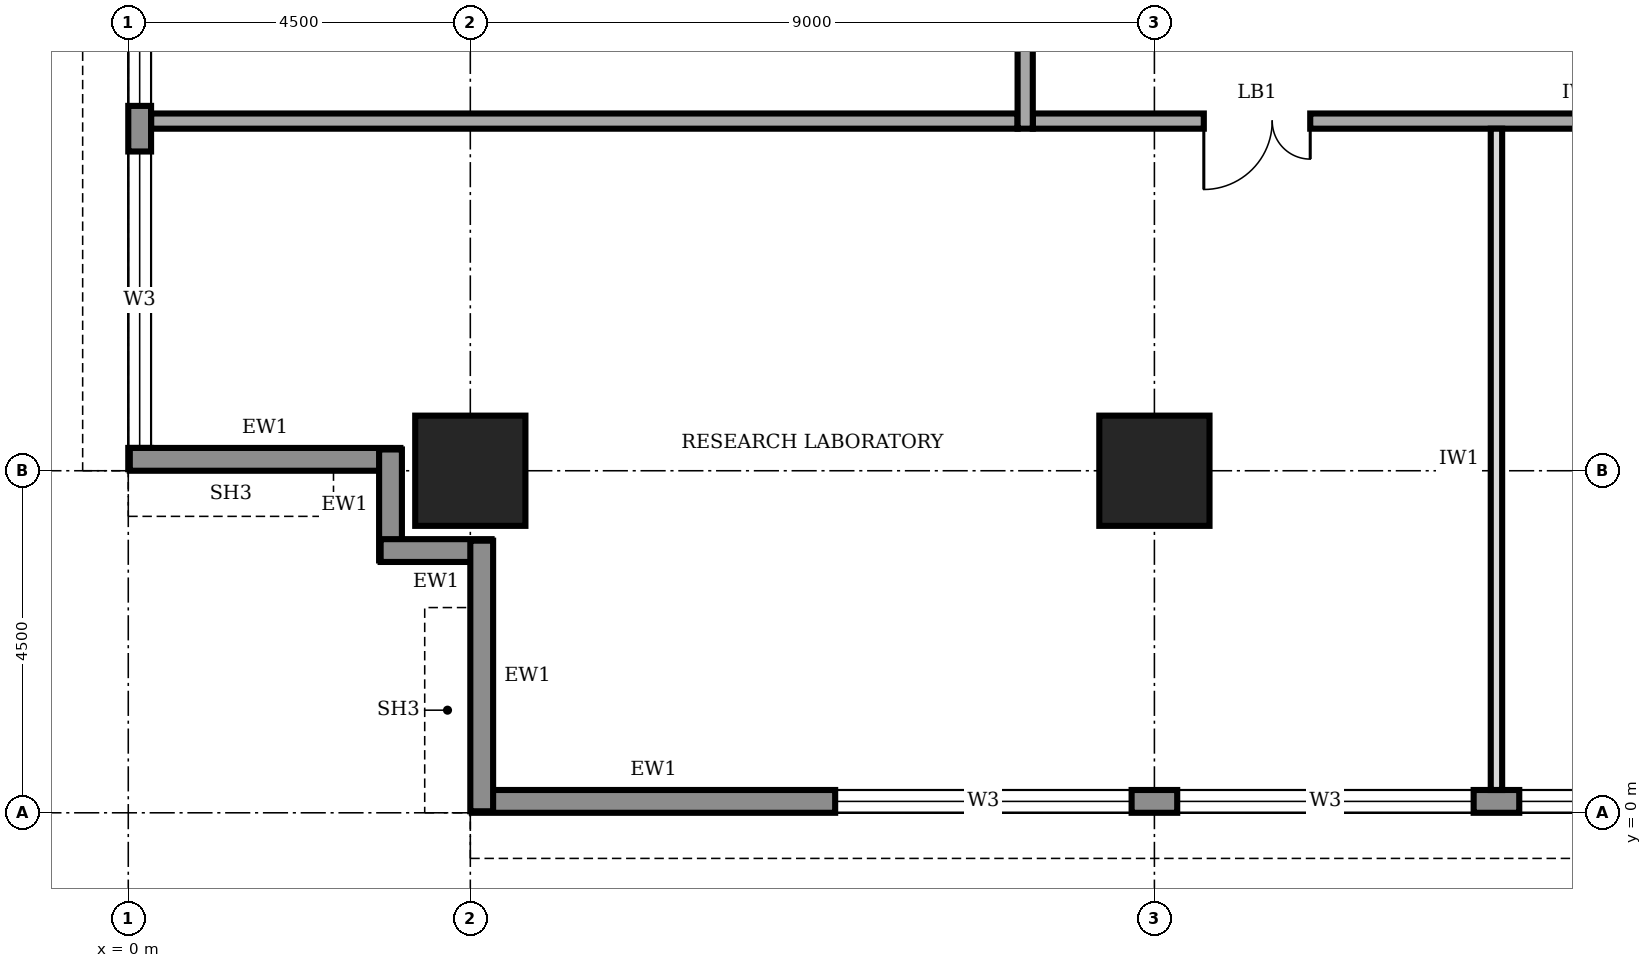
"""IFC4 building model, lengths in metres.
Left out: names, types, materials, properties, quantities, classifications, styles, units other than length and angle.
Written with IfcOpenShell. Run it as: python <this file> out.ifc"""

import sys

from ifc_helpers import new_model, si_unit, direction, frame, frame_2d, origin, origin_2d, place, context, subcontext, project, spatial, rectangle, extrude, element, fill, save


model = new_model("IFC4")
c1 = context("Model", 3, precision=1e-05, world=origin(), true_north=direction((0.0, 1.0)))
c2 = subcontext(c1, "Body", "Model", "MODEL_VIEW")
j1 = project(units=[si_unit("LENGTHUNIT", "METRE"), si_unit("PLANEANGLEUNIT", "RADIAN")], contexts=[c1])
p1 = place(None, origin())
s1 = spatial("IfcSite", under=j1, at=p1, CompositionType="ELEMENT")
p2 = place(p1, origin())
s2 = spatial("IfcBuilding", under=s1, at=p2, CompositionType="ELEMENT")
p3 = place(p2, frame((0.0, 0.0, 253.0)))
s3 = spatial("IfcBuildingStorey", under=s2, at=p3, CompositionType="ELEMENT", Elevation=253.0)
for number, where, z_axis, x_axis in (
    (1, (4.5, 4.5, 0.0), (0.0, 0.0, 1.0), (1.0, 0.0, 0.0)),
    (2, (13.5, 4.5, 0.0), (0.0, 0.0, 1.0), (1.0, 0.0, 0.0)),
):
    element("IfcColumn", number, at=place(p3, frame(where, z_axis=z_axis, x_axis=x_axis)), inside=s3, PredefinedType="COLUMN", context=c2, shape_type="SweptSolid", body=[
        extrude(rectangle(XDim=1.45, YDim=1.45, at=origin_2d()), origin(), (0.0, 0.0, 1.0), 4.0),
    ])
p4 = place(p3, frame((4.52, 0.15, 0.0), z_axis=(0.0, 0.0, 1.0), x_axis=(1.0, 0.0, 0.0)))
e3 = element("IfcWall", 3, at=p4, inside=s3, PredefinedType="STANDARD", context=c2, shape_type="SweptSolid", body=[
    extrude(rectangle(XDim=31.46, YDim=0.3, at=frame_2d((15.73, 0.0))), origin(), (0.0, 0.0, 1.0), 3.75),
])
p5 = place(p4, frame((4.78, 0.0, 0.95)))
e4 = element("IfcOpeningElement", 4, at=p5, cuts=e3, PredefinedType="OPENING", context=c2, shape_type="SweptSolid", body=[
    extrude(rectangle(XDim=3.9, YDim=1.8, at=frame_2d((1.95, 0.9))), frame((0.0, 0.16, 0.0), z_axis=(0.0, -1.0, 0.0), x_axis=(1.0, 0.0, 0.0)), (0.0, 0.0, 1.0), 0.32),
])
p6 = place(p4, frame((9.28, 0.0, 0.95)))
e5 = element("IfcOpeningElement", 5, at=p6, cuts=e3, PredefinedType="OPENING", context=c2, shape_type="SweptSolid", body=[
    extrude(rectangle(XDim=3.9, YDim=1.8, at=frame_2d((1.95, 0.9))), frame((0.0, 0.16, 0.0), z_axis=(0.0, -1.0, 0.0), x_axis=(1.0, 0.0, 0.0)), (0.0, 0.0, 1.0), 0.32),
])
p7 = place(p4, frame((13.78, 0.0, 0.95)))
e6 = element("IfcOpeningElement", 6, at=p7, cuts=e3, PredefinedType="OPENING", context=c2, shape_type="SweptSolid", body=[
    extrude(rectangle(XDim=3.9, YDim=1.8, at=frame_2d((1.95, 0.9))), frame((0.0, 0.16, 0.0), z_axis=(0.0, -1.0, 0.0), x_axis=(1.0, 0.0, 0.0)), (0.0, 0.0, 1.0), 0.32),
])
p8 = place(p4, frame((18.28, 0.0, 0.95)))
e7 = element("IfcOpeningElement", 7, at=p8, cuts=e3, PredefinedType="OPENING", context=c2, shape_type="SweptSolid", body=[
    extrude(rectangle(XDim=3.9, YDim=1.8, at=frame_2d((1.95, 0.9))), frame((0.0, 0.16, 0.0), z_axis=(0.0, -1.0, 0.0), x_axis=(1.0, 0.0, 0.0)), (0.0, 0.0, 1.0), 0.32),
])
p9 = place(p4, frame((22.78, 0.0, 0.95)))
e8 = element("IfcOpeningElement", 8, at=p9, cuts=e3, PredefinedType="OPENING", context=c2, shape_type="SweptSolid", body=[
    extrude(rectangle(XDim=3.9, YDim=1.8, at=frame_2d((1.95, 0.9))), frame((0.0, 0.16, 0.0), z_axis=(0.0, -1.0, 0.0), x_axis=(1.0, 0.0, 0.0)), (0.0, 0.0, 1.0), 0.32),
])
p10 = place(p4, frame((27.28, 0.0, 0.95)))
e9 = element("IfcOpeningElement", 9, at=p10, cuts=e3, PredefinedType="OPENING", context=c2, shape_type="SweptSolid", body=[
    extrude(rectangle(XDim=3.9, YDim=1.8, at=frame_2d((1.95, 0.9))), frame((0.0, 0.16, 0.0), z_axis=(0.0, -1.0, 0.0), x_axis=(1.0, 0.0, 0.0)), (0.0, 0.0, 1.0), 0.32),
])
p11 = place(p3, frame((0.15, 35.98, 0.0), z_axis=(0.0, 0.0, 1.0), x_axis=(0.0, -1.0, 0.0)))
e10 = element("IfcWall", 10, at=p11, inside=s3, PredefinedType="STANDARD", context=c2, shape_type="SweptSolid", body=[
    extrude(rectangle(XDim=31.46, YDim=0.3, at=frame_2d((15.73, 0.0))), origin(), (0.0, 0.0, 1.0), 3.75),
])
p12 = place(p11, frame((27.28, 0.0, 0.95)))
e11 = element("IfcOpeningElement", 11, at=p12, cuts=e10, PredefinedType="OPENING", context=c2, shape_type="SweptSolid", body=[
    extrude(rectangle(XDim=3.9, YDim=1.8, at=frame_2d((1.95, 0.9))), frame((0.0, 0.16, 0.0), z_axis=(0.0, -1.0, 0.0), x_axis=(1.0, 0.0, 0.0)), (0.0, 0.0, 1.0), 0.32),
])
p13 = place(p11, frame((22.78, 0.0, 0.95)))
e12 = element("IfcOpeningElement", 12, at=p13, cuts=e10, PredefinedType="OPENING", context=c2, shape_type="SweptSolid", body=[
    extrude(rectangle(XDim=3.9, YDim=1.8, at=frame_2d((1.95, 0.9))), frame((0.0, 0.16, 0.0), z_axis=(0.0, -1.0, 0.0), x_axis=(1.0, 0.0, 0.0)), (0.0, 0.0, 1.0), 0.32),
])
p14 = place(p11, frame((18.28, 0.0, 0.95)))
e13 = element("IfcOpeningElement", 13, at=p14, cuts=e10, PredefinedType="OPENING", context=c2, shape_type="SweptSolid", body=[
    extrude(rectangle(XDim=3.9, YDim=1.8, at=frame_2d((1.95, 0.9))), frame((0.0, 0.16, 0.0), z_axis=(0.0, -1.0, 0.0), x_axis=(1.0, 0.0, 0.0)), (0.0, 0.0, 1.0), 0.32),
])
p15 = place(p11, frame((13.78, 0.0, 0.95)))
e14 = element("IfcOpeningElement", 14, at=p15, cuts=e10, PredefinedType="OPENING", context=c2, shape_type="SweptSolid", body=[
    extrude(rectangle(XDim=3.9, YDim=1.8, at=frame_2d((1.95, 0.9))), frame((0.0, 0.16, 0.0), z_axis=(0.0, -1.0, 0.0), x_axis=(1.0, 0.0, 0.0)), (0.0, 0.0, 1.0), 0.32),
])
p16 = place(p11, frame((9.28, 0.0, 0.95)))
e15 = element("IfcOpeningElement", 15, at=p16, cuts=e10, PredefinedType="OPENING", context=c2, shape_type="SweptSolid", body=[
    extrude(rectangle(XDim=3.9, YDim=1.8, at=frame_2d((1.95, 0.9))), frame((0.0, 0.16, 0.0), z_axis=(0.0, -1.0, 0.0), x_axis=(1.0, 0.0, 0.0)), (0.0, 0.0, 1.0), 0.32),
])
p17 = place(p11, frame((4.78, 0.0, 0.95)))
e16 = element("IfcOpeningElement", 16, at=p17, cuts=e10, PredefinedType="OPENING", context=c2, shape_type="SweptSolid", body=[
    extrude(rectangle(XDim=3.9, YDim=1.8, at=frame_2d((1.95, 0.9))), frame((0.0, 0.16, 0.0), z_axis=(0.0, -1.0, 0.0), x_axis=(1.0, 0.0, 0.0)), (0.0, 0.0, 1.0), 0.32),
])
p18 = place(p3, frame((0.02, 4.65, 0.0), z_axis=(0.0, 0.0, 1.0), x_axis=(1.0, 0.0, 0.0)))
e17 = element("IfcWall", 17, at=p18, inside=s3, PredefinedType="STANDARD", context=c2, shape_type="SweptSolid", body=[
    extrude(rectangle(XDim=3.56, YDim=0.3, at=frame_2d((1.78, 0.0))), origin(), (0.0, 0.0, 1.0), 2.85),
])
for number, where, z_axis, x_axis in (
    (18, (3.45, 4.78, 0.0), (0.0, 0.0, 1.0), (0.0, -1.0, 0.0)),
    (19, (3.32, 3.45, 0.0), (0.0, 0.0, 1.0), (1.0, 0.0, 0.0)),
):
    element("IfcWall", number, at=place(p3, frame(where, z_axis=z_axis, x_axis=x_axis)), inside=s3, PredefinedType="STANDARD", context=c2, shape_type="SweptSolid", body=[
        extrude(rectangle(XDim=1.46, YDim=0.3, at=frame_2d((0.73, 0.0))), origin(), (0.0, 0.0, 1.0), 3.75),
    ])
p19 = place(p3, frame((4.65, 3.58, 0.0), z_axis=(0.0, 0.0, 1.0), x_axis=(0.0, -1.0, 0.0)))
e20 = element("IfcWall", 20, at=p19, inside=s3, PredefinedType="STANDARD", context=c2, shape_type="SweptSolid", body=[
    extrude(rectangle(XDim=3.56, YDim=0.3, at=frame_2d((1.78, 0.0))), origin(), (0.0, 0.0, 1.0), 2.85),
])
p20 = place(p3, frame((11.9, 9.1, 0.0), z_axis=(0.0, 0.0, 1.0), x_axis=(1.0, 0.0, 0.0)))
e21 = element("IfcWall", 21, at=p20, inside=s3, PredefinedType="SOLIDWALL", context=c2, shape_type="SweptSolid", body=[
    extrude(rectangle(XDim=16.9, YDim=0.2, at=frame_2d((8.45, 0.0))), origin(), (0.0, 0.0, 1.0), 3.75),
])
p21 = place(p20, frame((2.25, 0.0, 0.0)))
e22 = element("IfcOpeningElement", 22, at=p21, cuts=e21, PredefinedType="OPENING", context=c2, shape_type="SweptSolid", body=[
    extrude(rectangle(XDim=1.4, YDim=2.1, at=frame_2d((0.7, 1.05))), frame((0.0, 0.11, 0.0), z_axis=(0.0, -1.0, 0.0), x_axis=(1.0, 0.0, 0.0)), (0.0, 0.0, 1.0), 0.22),
])
p22 = place(p20, frame((10.8, 0.0, 0.0)))
e23 = element("IfcOpeningElement", 23, at=p22, cuts=e21, PredefinedType="OPENING", context=c2, shape_type="SweptSolid", body=[
    extrude(rectangle(XDim=1.4, YDim=2.1, at=frame_2d((0.7, 1.05))), frame((0.0, 0.11, 0.0), z_axis=(0.0, -1.0, 0.0), x_axis=(1.0, 0.0, 0.0)), (0.0, 0.0, 1.0), 0.22),
])
p23 = place(p3, frame((11.8, 31.3, 0.0), z_axis=(0.0, 0.0, 1.0), x_axis=(0.0, -1.0, 0.0)))
e24 = element("IfcWall", 24, at=p23, inside=s3, PredefinedType="SOLIDWALL", context=c2, shape_type="SweptSolid", body=[
    extrude(rectangle(XDim=22.3, YDim=0.2, at=frame_2d((11.15, 0.0))), origin(), (0.0, 0.0, 1.0), 3.75),
])
p24 = place(p23, frame((19.55, 0.0, 0.0)))
e25 = element("IfcOpeningElement", 25, at=p24, cuts=e24, PredefinedType="OPENING", context=c2, shape_type="SweptSolid", body=[
    extrude(rectangle(XDim=1.0, YDim=2.1, at=frame_2d((0.5, 1.05))), frame((0.0, 0.11, 0.0), z_axis=(0.0, -1.0, 0.0), x_axis=(1.0, 0.0, 0.0)), (0.0, 0.0, 1.0), 0.22),
])
p25 = place(p23, frame((15.65, 0.0, 0.0)))
e26 = element("IfcOpeningElement", 26, at=p25, cuts=e24, PredefinedType="OPENING", context=c2, shape_type="SweptSolid", body=[
    extrude(rectangle(XDim=0.9, YDim=2.1, at=frame_2d((0.45, 1.05))), frame((0.0, 0.11, 0.0), z_axis=(0.0, -1.0, 0.0), x_axis=(1.0, 0.0, 0.0)), (0.0, 0.0, 1.0), 0.22),
])
p26 = place(p23, frame((10.85, 0.0, 0.0)))
e27 = element("IfcOpeningElement", 27, at=p26, cuts=e24, PredefinedType="OPENING", context=c2, shape_type="SweptSolid", body=[
    extrude(rectangle(XDim=0.9, YDim=2.1, at=frame_2d((0.45, 1.05))), frame((0.0, 0.11, 0.0), z_axis=(0.0, -1.0, 0.0), x_axis=(1.0, 0.0, 0.0)), (0.0, 0.0, 1.0), 0.22),
])
p27 = place(p23, frame((7.8, 0.0, 0.0)))
e28 = element("IfcOpeningElement", 28, at=p27, cuts=e24, PredefinedType="OPENING", context=c2, shape_type="SweptSolid", body=[
    extrude(rectangle(XDim=0.9, YDim=2.1, at=frame_2d((0.45, 1.05))), frame((0.0, 0.11, 0.0), z_axis=(0.0, -1.0, 0.0), x_axis=(1.0, 0.0, 0.0)), (0.0, 0.0, 1.0), 0.22),
])
p28 = place(p23, frame((4.8, 0.0, 0.0)))
e29 = element("IfcOpeningElement", 29, at=p28, cuts=e24, PredefinedType="OPENING", context=c2, shape_type="SweptSolid", body=[
    extrude(rectangle(XDim=1.0, YDim=2.1, at=frame_2d((0.5, 1.05))), frame((0.0, 0.11, 0.0), z_axis=(0.0, -1.0, 0.0), x_axis=(1.0, 0.0, 0.0)), (0.0, 0.0, 1.0), 0.22),
])
p29 = place(p23, frame((12.9, 0.0, 0.0)))
e30 = element("IfcOpeningElement", 30, at=p29, cuts=e24, PredefinedType="OPENING", context=c2, shape_type="SweptSolid", body=[
    extrude(rectangle(XDim=1.0, YDim=2.1, at=frame_2d((0.5, 1.05))), frame((0.0, 0.11, 0.0), z_axis=(0.0, -1.0, 0.0), x_axis=(1.0, 0.0, 0.0)), (0.0, 0.0, 1.0), 0.22),
])
p30 = place(p23, frame((1.55, 0.0, 0.0)))
e31 = element("IfcOpeningElement", 31, at=p30, cuts=e24, PredefinedType="OPENING", context=c2, shape_type="SweptSolid", body=[
    extrude(rectangle(XDim=1.0, YDim=2.1, at=frame_2d((0.5, 1.05))), frame((0.0, 0.11, 0.0), z_axis=(0.0, -1.0, 0.0), x_axis=(1.0, 0.0, 0.0)), (0.0, 0.0, 1.0), 0.22),
])
p31 = place(p3, frame((0.3, 9.1, 0.0), z_axis=(0.0, 0.0, 1.0), x_axis=(1.0, 0.0, 0.0)))
e32 = element("IfcWall", 32, at=p31, inside=s3, PredefinedType="SOLIDWALL", context=c2, shape_type="SweptSolid", body=[
    extrude(rectangle(XDim=11.4, YDim=0.2, at=frame_2d((5.7, 0.0))), origin(), (0.0, 0.0, 1.0), 3.75),
])
p32 = place(p3, frame((18.0, 0.3, 0.0), z_axis=(0.0, 0.0, 1.0), x_axis=(0.0, 1.0, 0.0)))
e33 = element("IfcWall", 33, at=p32, inside=s3, PredefinedType="PARTITIONING", context=c2, shape_type="SweptSolid", body=[
    extrude(rectangle(XDim=8.7, YDim=0.15, at=frame_2d((4.35, 0.0))), origin(), (0.0, 0.0, 1.0), 3.75),
])
p33 = place(p5, origin())
e34 = element("IfcWindow", 34, at=p33, inside=s3, PartitioningType="SINGLE_PANEL", PredefinedType="WINDOW", context=c2, shape_type="SweptSolid", body=[
    extrude(rectangle(XDim=3.9, YDim=1.8, at=frame_2d((1.95, 0.9))), frame((0.0, 0.03, 0.0), z_axis=(0.0, -1.0, 0.0), x_axis=(1.0, 0.0, 0.0)), (0.0, 0.0, 1.0), 0.06),
])
fill(e4, e34)
p34 = place(p6, origin())
e35 = element("IfcWindow", 35, at=p34, inside=s3, PartitioningType="SINGLE_PANEL", PredefinedType="WINDOW", context=c2, shape_type="SweptSolid", body=[
    extrude(rectangle(XDim=3.9, YDim=1.8, at=frame_2d((1.95, 0.9))), frame((0.0, 0.03, 0.0), z_axis=(0.0, -1.0, 0.0), x_axis=(1.0, 0.0, 0.0)), (0.0, 0.0, 1.0), 0.06),
])
fill(e5, e35)
p35 = place(p7, origin())
e36 = element("IfcWindow", 36, at=p35, inside=s3, PartitioningType="SINGLE_PANEL", PredefinedType="WINDOW", context=c2, shape_type="SweptSolid", body=[
    extrude(rectangle(XDim=3.9, YDim=1.8, at=frame_2d((1.95, 0.9))), frame((0.0, 0.03, 0.0), z_axis=(0.0, -1.0, 0.0), x_axis=(1.0, 0.0, 0.0)), (0.0, 0.0, 1.0), 0.06),
])
fill(e6, e36)
p36 = place(p12, origin())
e37 = element("IfcWindow", 37, at=p36, inside=s3, PartitioningType="SINGLE_PANEL", PredefinedType="WINDOW", context=c2, shape_type="SweptSolid", body=[
    extrude(rectangle(XDim=3.9, YDim=1.8, at=frame_2d((1.95, 0.9))), frame((0.0, 0.03, 0.0), z_axis=(0.0, -1.0, 0.0), x_axis=(1.0, 0.0, 0.0)), (0.0, 0.0, 1.0), 0.06),
])
fill(e11, e37)
p37 = place(p13, origin())
e38 = element("IfcWindow", 38, at=p37, inside=s3, PartitioningType="SINGLE_PANEL", PredefinedType="WINDOW", context=c2, shape_type="SweptSolid", body=[
    extrude(rectangle(XDim=3.9, YDim=1.8, at=frame_2d((1.95, 0.9))), frame((0.0, 0.03, 0.0), z_axis=(0.0, -1.0, 0.0), x_axis=(1.0, 0.0, 0.0)), (0.0, 0.0, 1.0), 0.06),
])
fill(e12, e38)
p38 = place(p21, frame((1.4, 0.0, 0.0), z_axis=(0.0, 0.0, 1.0), x_axis=(-1.0, 0.0, 0.0)))
e39 = element("IfcDoor", 39, at=p38, inside=s3, OperationType="DOUBLE_DOOR_SINGLE_SWING", PredefinedType="DOOR", context=c2, shape_type="SweptSolid", body=[
    extrude(rectangle(XDim=1.4, YDim=2.1, at=frame_2d((0.7, 1.05))), frame((0.0, 0.025, 0.0), z_axis=(0.0, -1.0, 0.0), x_axis=(1.0, 0.0, 0.0)), (0.0, 0.0, 1.0), 0.05),
])
fill(e22, e39)
save(model, sys.argv[1])
